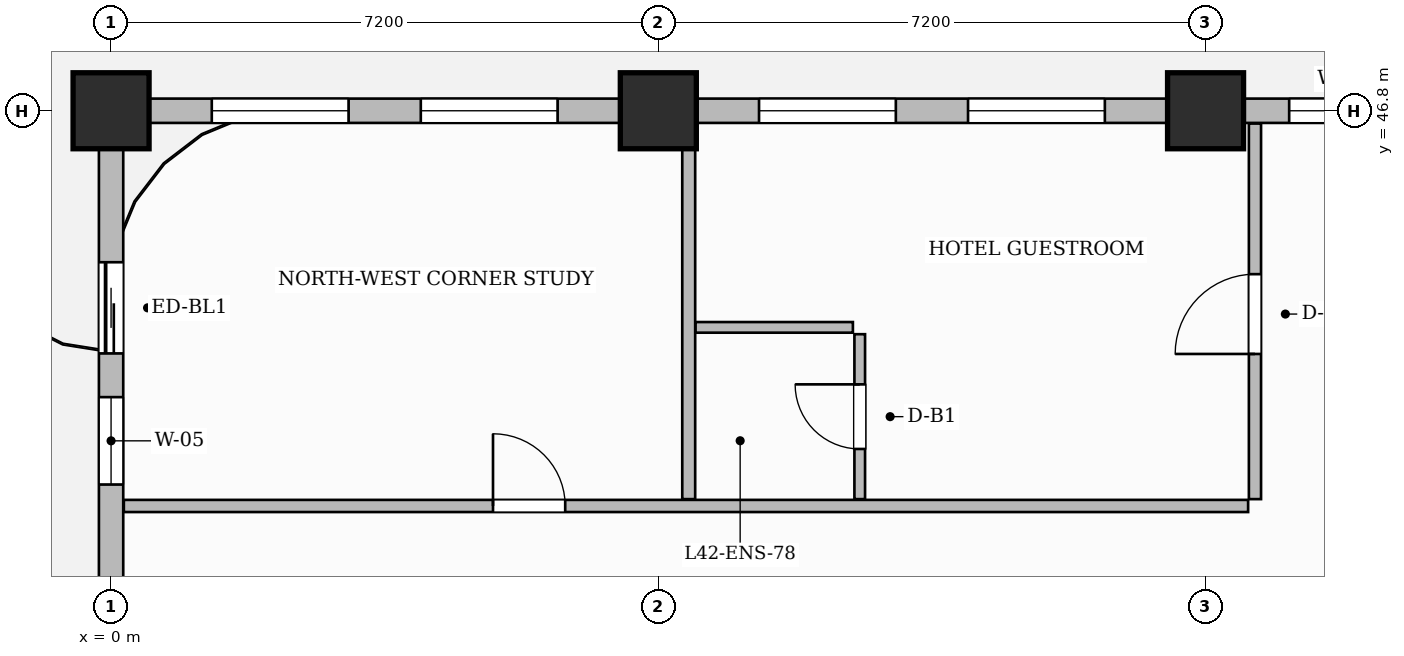
"""IFC4 building model, lengths in metres.
Left out: names, types, materials, properties, quantities, classifications, styles, units other than length and angle.
Written with IfcOpenShell. Run it as: python <this file> out.ifc"""

import sys

from ifc_helpers import new_model, si_unit, direction, frame, frame_2d, origin, origin_2d, place, context, subcontext, project, spatial, rectangle, extrude, source, transform, mapped, element, fill, save


model = new_model("IFC4")
c1 = context("Model", 3, precision=1e-05, world=origin(), true_north=direction((0.0, 1.0)))
c2 = subcontext(c1, "Body", "Model", "MODEL_VIEW")
j1 = project(units=[si_unit("LENGTHUNIT", "METRE"), si_unit("PLANEANGLEUNIT", "RADIAN")], contexts=[c1])
p1 = place(None, origin())
s1 = spatial("IfcSite", under=j1, at=p1, CompositionType="ELEMENT")
p2 = place(p1, origin())
s2 = spatial("IfcBuilding", under=s1, at=p2, CompositionType="ELEMENT")
p3 = place(p2, frame((0.0, 0.0, 169.55)))
s3 = spatial("IfcBuildingStorey", under=s2, at=p3, CompositionType="ELEMENT", Elevation=169.55)
m1 = source(origin(), c2, "Body", "SweptSolid", [
    extrude(rectangle(XDim=1.0, YDim=1.0, at=origin_2d()), origin(), (0.0, 0.0, 1.0), 3.85),
])
for number, where, z_axis, x_axis in (
    (1, (0.0, 46.8, 0.0), (0.0, 0.0, 1.0), (1.0, 0.0, 0.0)),
    (2, (7.2, 46.8, 0.0), (0.0, 0.0, 1.0), (1.0, 0.0, 0.0)),
    (3, (14.4, 46.8, 0.0), (0.0, 0.0, 1.0), (1.0, 0.0, 0.0)),
):
    element("IfcColumn", number, at=place(p3, frame(where, z_axis=z_axis, x_axis=x_axis)), inside=s3, PredefinedType="COLUMN", context=c2, shape_type="MappedRepresentation", body=[
        mapped(m1, transform((0.0, 0.0, 0.0), scale=1.0)),
    ])
p4 = place(p3, frame((15.05, 41.69, 0.0), z_axis=(0.0, 0.0, 1.0), x_axis=(0.0, 1.0, 0.0)))
e4 = element("IfcWall", 4, at=p4, inside=s3, PredefinedType="PARTITIONING", context=c2, shape_type="SweptSolid", body=[
    extrude(rectangle(XDim=4.942, YDim=0.16, at=frame_2d((2.471, 0.0))), origin(), (0.0, 0.0, 1.0), 3.6),
])
p5 = place(p4, frame((1.91, 0.0, 0.0)))
e5 = element("IfcOpeningElement", 5, at=p5, cuts=e4, PredefinedType="OPENING", context=c2, shape_type="SweptSolid", body=[
    extrude(rectangle(XDim=1.05, YDim=2.25, at=frame_2d((0.525, 1.125))), frame((0.0, 0.09, 0.0), z_axis=(0.0, -1.0, 0.0), x_axis=(1.0, 0.0, 0.0)), (0.0, 0.0, 1.0), 0.18),
])
p6 = place(p3, frame((7.6, 41.69, 0.0), z_axis=(0.0, 0.0, 1.0), x_axis=(0.0, 1.0, 0.0)))
e6 = element("IfcWall", 6, at=p6, inside=s3, PredefinedType="PARTITIONING", context=c2, shape_type="SweptSolid", body=[
    extrude(rectangle(XDim=4.87, YDim=0.17, at=frame_2d((2.435, 0.0))), origin(), (0.0, 0.0, 1.0), 3.6),
])
p7 = place(p3, frame((0.168, 41.6, 0.0), z_axis=(0.0, 0.0, 1.0), x_axis=(1.0, 0.0, 0.0)))
e7 = element("IfcWall", 7, at=p7, inside=s3, PredefinedType="PARTITIONING", context=c2, shape_type="SweptSolid", body=[
    extrude(rectangle(XDim=14.792, YDim=0.16, at=frame_2d((7.396, 0.0))), origin(), (0.0, 0.0, 1.0), 3.085),
])
p8 = place(p7, frame((4.857, 0.0, 0.0)))
e8 = element("IfcOpeningElement", 8, at=p8, cuts=e7, PredefinedType="OPENING", context=c2, shape_type="SweptSolid", body=[
    extrude(rectangle(XDim=0.95, YDim=2.15, at=frame_2d((0.475, 1.075))), frame((0.0, 0.09, 0.0), z_axis=(0.0, -1.0, 0.0), x_axis=(1.0, 0.0, 0.0)), (0.0, 0.0, 1.0), 0.18),
])
p9 = place(p3, frame((7.69, 43.95, 0.0), z_axis=(0.0, 0.0, 1.0), x_axis=(1.0, 0.0, 0.0)))
e9 = element("IfcWall", 9, at=p9, inside=s3, PredefinedType="PARTITIONING", context=c2, shape_type="SweptSolid", body=[
    extrude(rectangle(XDim=2.07, YDim=0.14, at=frame_2d((1.035, 0.0))), origin(), (0.0, 0.0, 1.0), 3.085),
])
p10 = place(p3, frame((9.85, 41.69, 0.0), z_axis=(0.0, 0.0, 1.0), x_axis=(0.0, 1.0, 0.0)))
e10 = element("IfcWall", 10, at=p10, inside=s3, PredefinedType="PARTITIONING", context=c2, shape_type="SweptSolid", body=[
    extrude(rectangle(XDim=2.17, YDim=0.14, at=frame_2d((1.085, 0.0))), origin(), (0.0, 0.0, 1.0), 3.6),
])
p11 = place(p10, frame((0.66, 0.0, 0.0)))
e11 = element("IfcOpeningElement", 11, at=p11, cuts=e10, PredefinedType="OPENING", context=c2, shape_type="SweptSolid", body=[
    extrude(rectangle(XDim=0.85, YDim=2.1, at=frame_2d((0.425, 1.05))), frame((0.0, 0.08, 0.0), z_axis=(0.0, -1.0, 0.0), x_axis=(1.0, 0.0, 0.0)), (0.0, 0.0, 1.0), 0.16),
])
p12 = place(p3, frame((0.0, 25.25, 0.0), z_axis=(0.0, 0.0, 1.0), x_axis=(0.0, 1.0, 0.0)))
e12 = element("IfcWall", 12, at=p12, inside=s3, PredefinedType="SOLIDWALL", context=c2, shape_type="SweptSolid", body=[
    extrude(rectangle(XDim=21.5, YDim=0.32, at=frame_2d((10.75, 0.0))), origin(), (0.0, 0.0, 1.0), 3.085),
])
p13 = place(p12, frame((18.357, 0.0, 0.0)))
e13 = element("IfcOpeningElement", 13, at=p13, cuts=e12, PredefinedType="OPENING", context=c2, shape_type="SweptSolid", body=[
    extrude(rectangle(XDim=1.2, YDim=2.2, at=frame_2d((0.6, 1.1))), frame((0.0, 0.17, 0.0), z_axis=(0.0, -1.0, 0.0), x_axis=(1.0, 0.0, 0.0)), (0.0, 0.0, 1.0), 0.34),
])
p14 = place(p12, frame((0.8, 0.0, 0.0)))
e14 = element("IfcOpeningElement", 14, at=p14, cuts=e12, PredefinedType="OPENING", context=c2, shape_type="SweptSolid", body=[
    extrude(rectangle(XDim=1.2, YDim=2.2, at=frame_2d((0.6, 1.1))), frame((0.0, 0.17, 0.0), z_axis=(0.0, -1.0, 0.0), x_axis=(1.0, 0.0, 0.0)), (0.0, 0.0, 1.0), 0.34),
])
p15 = place(p12, frame((3.425, 0.0, 0.8)))
e15 = element("IfcOpeningElement", 15, at=p15, cuts=e12, PredefinedType="OPENING", context=c2, shape_type="SweptSolid", body=[
    extrude(rectangle(XDim=1.8, YDim=1.85, at=frame_2d((0.9, 0.925))), frame((0.0, 0.17, 0.0), z_axis=(0.0, -1.0, 0.0), x_axis=(1.0, 0.0, 0.0)), (0.0, 0.0, 1.0), 0.34),
])
p16 = place(p12, frame((8.475, 0.0, 0.8)))
e16 = element("IfcOpeningElement", 16, at=p16, cuts=e12, PredefinedType="OPENING", context=c2, shape_type="SweptSolid", body=[
    extrude(rectangle(XDim=1.8, YDim=1.85, at=frame_2d((0.9, 0.925))), frame((0.0, 0.17, 0.0), z_axis=(0.0, -1.0, 0.0), x_axis=(1.0, 0.0, 0.0)), (0.0, 0.0, 1.0), 0.34),
])
p17 = place(p12, frame((11.225, 0.0, 0.8)))
e17 = element("IfcOpeningElement", 17, at=p17, cuts=e12, PredefinedType="OPENING", context=c2, shape_type="SweptSolid", body=[
    extrude(rectangle(XDim=1.8, YDim=1.85, at=frame_2d((0.9, 0.925))), frame((0.0, 0.17, 0.0), z_axis=(0.0, -1.0, 0.0), x_axis=(1.0, 0.0, 0.0)), (0.0, 0.0, 1.0), 0.34),
])
p18 = place(p12, frame((16.632, 0.0, 0.8)))
e18 = element("IfcOpeningElement", 18, at=p18, cuts=e12, PredefinedType="OPENING", context=c2, shape_type="SweptSolid", body=[
    extrude(rectangle(XDim=1.15, YDim=1.8, at=frame_2d((0.575, 0.9))), frame((0.0, 0.17, 0.0), z_axis=(0.0, -1.0, 0.0), x_axis=(1.0, 0.0, 0.0)), (0.0, 0.0, 1.0), 0.34),
])
p19 = place(p3, frame((0.0, 46.8, 0.0), z_axis=(0.0, 0.0, 1.0), x_axis=(1.0, 0.0, 0.0)))
e19 = element("IfcWall", 19, at=p19, inside=s3, PredefinedType="SOLIDWALL", context=c2, shape_type="SweptSolid", body=[
    extrude(rectangle(XDim=18.0, YDim=0.32, at=frame_2d((9.0, 0.0))), origin(), (0.0, 0.0, 1.0), 3.085),
])
p20 = place(p19, frame((1.325, 0.0, 0.8)))
e20 = element("IfcOpeningElement", 20, at=p20, cuts=e19, PredefinedType="OPENING", context=c2, shape_type="SweptSolid", body=[
    extrude(rectangle(XDim=1.8, YDim=1.85, at=frame_2d((0.9, 0.925))), frame((0.0, 0.17, 0.0), z_axis=(0.0, -1.0, 0.0), x_axis=(1.0, 0.0, 0.0)), (0.0, 0.0, 1.0), 0.34),
])
p21 = place(p19, frame((4.075, 0.0, 0.8)))
e21 = element("IfcOpeningElement", 21, at=p21, cuts=e19, PredefinedType="OPENING", context=c2, shape_type="SweptSolid", body=[
    extrude(rectangle(XDim=1.8, YDim=1.85, at=frame_2d((0.9, 0.925))), frame((0.0, 0.17, 0.0), z_axis=(0.0, -1.0, 0.0), x_axis=(1.0, 0.0, 0.0)), (0.0, 0.0, 1.0), 0.34),
])
p22 = place(p19, frame((8.525, 0.0, 0.8)))
e22 = element("IfcOpeningElement", 22, at=p22, cuts=e19, PredefinedType="OPENING", context=c2, shape_type="SweptSolid", body=[
    extrude(rectangle(XDim=1.8, YDim=1.85, at=frame_2d((0.9, 0.925))), frame((0.0, 0.17, 0.0), z_axis=(0.0, -1.0, 0.0), x_axis=(1.0, 0.0, 0.0)), (0.0, 0.0, 1.0), 0.34),
])
p23 = place(p19, frame((11.275, 0.0, 0.8)))
e23 = element("IfcOpeningElement", 23, at=p23, cuts=e19, PredefinedType="OPENING", context=c2, shape_type="SweptSolid", body=[
    extrude(rectangle(XDim=1.8, YDim=1.85, at=frame_2d((0.9, 0.925))), frame((0.0, 0.17, 0.0), z_axis=(0.0, -1.0, 0.0), x_axis=(1.0, 0.0, 0.0)), (0.0, 0.0, 1.0), 0.34),
])
p24 = place(p19, frame((15.5, 0.0, 0.8)))
e24 = element("IfcOpeningElement", 24, at=p24, cuts=e19, PredefinedType="OPENING", context=c2, shape_type="SweptSolid", body=[
    extrude(rectangle(XDim=1.4, YDim=1.85, at=frame_2d((0.7, 0.925))), frame((0.0, 0.17, 0.0), z_axis=(0.0, -1.0, 0.0), x_axis=(1.0, 0.0, 0.0)), (0.0, 0.0, 1.0), 0.34),
])
m2 = source(origin(), c2, "Body", "SweptSolid", [
    extrude(rectangle(XDim=0.95, YDim=2.15, at=frame_2d((0.475, 1.075))), frame((0.0, 0.025, 0.0), z_axis=(0.0, -1.0, 0.0), x_axis=(1.0, 0.0, 0.0)), (0.0, 0.0, 1.0), 0.05),
])
p25 = place(p8, origin())
e25 = element("IfcDoor", 25, at=p25, inside=s3, OperationType="SINGLE_SWING_LEFT", PredefinedType="DOOR", context=c2, shape_type="MappedRepresentation", body=[
    mapped(m2, transform((0.0, 0.0, 0.0), scale=1.0)),
])
fill(e8, e25)
m3 = source(origin(), c2, "Body", "SweptSolid", [
    extrude(rectangle(XDim=0.85, YDim=2.1, at=frame_2d((0.425, 1.05))), frame((0.0, 0.025, 0.0), z_axis=(0.0, -1.0, 0.0), x_axis=(1.0, 0.0, 0.0)), (0.0, 0.0, 1.0), 0.05),
])
p26 = place(p11, origin())
e26 = element("IfcDoor", 26, at=p26, inside=s3, OperationType="SINGLE_SWING_RIGHT", PredefinedType="DOOR", context=c2, shape_type="MappedRepresentation", body=[
    mapped(m3, transform((0.0, 0.0, 0.0), scale=1.0)),
])
fill(e11, e26)
m4 = source(origin(), c2, "Body", "SweptSolid", [
    extrude(rectangle(XDim=1.05, YDim=2.25, at=frame_2d((0.525, 1.125))), frame((0.0, 0.025, 0.0), z_axis=(0.0, -1.0, 0.0), x_axis=(1.0, 0.0, 0.0)), (0.0, 0.0, 1.0), 0.05),
])
p27 = place(p5, origin())
e27 = element("IfcDoor", 27, at=p27, inside=s3, OperationType="SINGLE_SWING_LEFT", PredefinedType="DOOR", context=c2, shape_type="MappedRepresentation", body=[
    mapped(m4, transform((0.0, 0.0, 0.0), scale=1.0)),
])
fill(e5, e27)
m5 = source(origin(), c2, "Body", "SweptSolid", [
    extrude(rectangle(XDim=1.2, YDim=2.2, at=frame_2d((0.6, 1.1))), frame((0.0, 0.025, 0.0), z_axis=(0.0, -1.0, 0.0), x_axis=(1.0, 0.0, 0.0)), (0.0, 0.0, 1.0), 0.05),
])
p28 = place(p13, origin())
e28 = element("IfcDoor", 28, at=p28, inside=s3, OperationType="SLIDING_TO_LEFT", PredefinedType="DOOR", context=c2, shape_type="MappedRepresentation", body=[
    mapped(m5, transform((0.0, 0.0, 0.0), scale=1.0)),
])
fill(e13, e28)
m6 = source(origin(), c2, "Body", "SweptSolid", [
    extrude(rectangle(XDim=1.15, YDim=1.8, at=frame_2d((0.575, 0.9))), frame((0.0, 0.03, 0.0), z_axis=(0.0, -1.0, 0.0), x_axis=(1.0, 0.0, 0.0)), (0.0, 0.0, 1.0), 0.06),
])
p29 = place(p18, origin())
e29 = element("IfcWindow", 29, at=p29, inside=s3, PartitioningType="SINGLE_PANEL", PredefinedType="WINDOW", context=c2, shape_type="MappedRepresentation", body=[
    mapped(m6, transform((0.0, 0.0, 0.0), scale=1.0)),
])
fill(e18, e29)
m7 = source(origin(), c2, "Body", "SweptSolid", [
    extrude(rectangle(XDim=1.8, YDim=1.85, at=frame_2d((0.9, 0.925))), frame((0.0, 0.03, 0.0), z_axis=(0.0, -1.0, 0.0), x_axis=(1.0, 0.0, 0.0)), (0.0, 0.0, 1.0), 0.06),
])
p30 = place(p20, origin())
e30 = element("IfcWindow", 30, at=p30, inside=s3, PartitioningType="DOUBLE_PANEL_VERTICAL", PredefinedType="WINDOW", context=c2, shape_type="MappedRepresentation", body=[
    mapped(m7, transform((0.0, 0.0, 0.0), scale=1.0)),
])
fill(e20, e30)
p31 = place(p21, origin())
e31 = element("IfcWindow", 31, at=p31, inside=s3, PartitioningType="DOUBLE_PANEL_VERTICAL", PredefinedType="WINDOW", context=c2, shape_type="MappedRepresentation", body=[
    mapped(m7, transform((0.0, 0.0, 0.0), scale=1.0)),
])
fill(e21, e31)
p32 = place(p22, origin())
e32 = element("IfcWindow", 32, at=p32, inside=s3, PartitioningType="DOUBLE_PANEL_VERTICAL", PredefinedType="WINDOW", context=c2, shape_type="MappedRepresentation", body=[
    mapped(m7, transform((0.0, 0.0, 0.0), scale=1.0)),
])
fill(e22, e32)
p33 = place(p23, origin())
e33 = element("IfcWindow", 33, at=p33, inside=s3, PartitioningType="DOUBLE_PANEL_VERTICAL", PredefinedType="WINDOW", context=c2, shape_type="MappedRepresentation", body=[
    mapped(m7, transform((0.0, 0.0, 0.0), scale=1.0)),
])
fill(e23, e33)
m8 = source(origin(), c2, "Body", "SweptSolid", [
    extrude(rectangle(XDim=1.4, YDim=1.85, at=frame_2d((0.7, 0.925))), frame((0.0, 0.03, 0.0), z_axis=(0.0, -1.0, 0.0), x_axis=(1.0, 0.0, 0.0)), (0.0, 0.0, 1.0), 0.06),
])
p34 = place(p24, origin())
e34 = element("IfcWindow", 34, at=p34, inside=s3, PartitioningType="SINGLE_PANEL", PredefinedType="WINDOW", context=c2, shape_type="MappedRepresentation", body=[
    mapped(m8, transform((0.0, 0.0, 0.0), scale=1.0)),
])
fill(e24, e34)
save(model, sys.argv[1])
